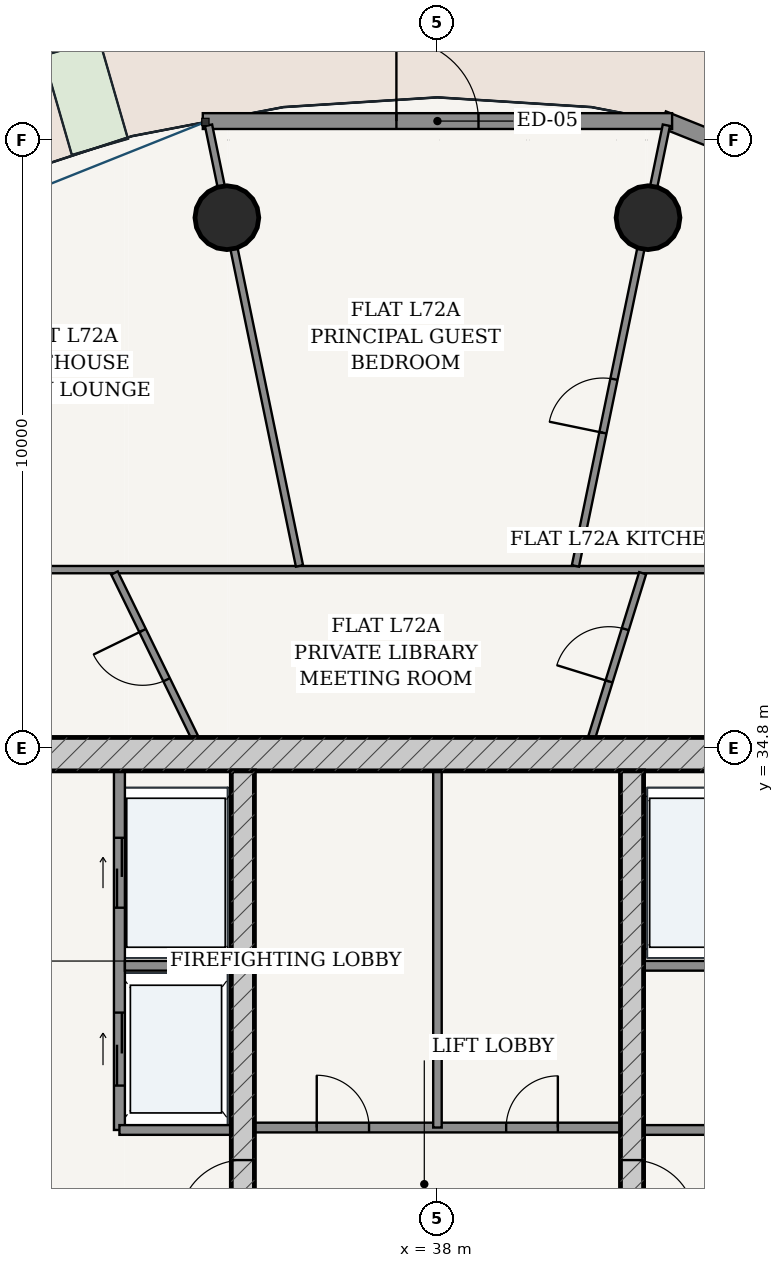
"""IFC4 building model, lengths in metres.
Left out: names, types, materials, properties, quantities, classifications, styles, units other than length and angle.
Written with IfcOpenShell. Run it as: python <this file> out.ifc"""

import sys

from ifc_helpers import new_model, si_unit, direction, frame, frame_2d, origin, origin_2d, place, context, subcontext, project, spatial, rectangle, hollow_circle, extrude, source, transform, mapped, element, fill, save


model = new_model("IFC4")
c1 = context("Model", 3, precision=1e-05, world=origin(), true_north=direction((-0.2419218956, 0.970295726276)))
c2 = subcontext(c1, "Body", "Model", "MODEL_VIEW")
j1 = project(units=[si_unit("LENGTHUNIT", "METRE"), si_unit("PLANEANGLEUNIT", "RADIAN")], contexts=[c1])
p1 = place(None, origin())
s1 = spatial("IfcSite", under=j1, at=p1, CompositionType="ELEMENT")
p2 = place(p1, origin())
s2 = spatial("IfcBuilding", under=s1, at=p2, CompositionType="ELEMENT")
p3 = place(p2, frame((0.0, 0.0, 274.45)))
s3 = spatial("IfcBuildingStorey", under=s2, at=p3, CompositionType="ELEMENT", Elevation=274.45)
p4 = place(p3, frame((28.825, 34.7, 0.0), z_axis=(0.0, 0.0, 1.0), x_axis=(1.0, 0.0, 0.0)))
e1 = element("IfcWall", 1, at=p4, inside=s3, PredefinedType="SHEAR", context=c2, shape_type="SweptSolid", body=[
    extrude(rectangle(XDim=18.35, YDim=0.55, at=frame_2d((9.175, 0.0))), origin(), (0.0, 0.0, 1.0), 3.49),
])
p5 = place(p3, frame((34.8, 19.175, 0.0), z_axis=(0.0, 0.0, 1.0), x_axis=(0.0, 1.0, 0.0)))
e2 = element("IfcWall", 2, at=p5, inside=s3, PredefinedType="SHEAR", context=c2, shape_type="SweptSolid", body=[
    extrude(rectangle(XDim=15.25, YDim=0.38, at=frame_2d((7.625, 0.0))), origin(), (0.0, 0.0, 1.0), 3.49),
])
p6 = place(p5, frame((7.8, 0.0, 0.0)))
e3 = element("IfcOpeningElement", 3, at=p6, cuts=e2, PredefinedType="OPENING", context=c2, shape_type="SweptSolid", body=[
    extrude(rectangle(XDim=1.05, YDim=2.15, at=frame_2d((0.525, 1.075))), frame((0.0, 0.2, 0.0), z_axis=(0.0, -1.0, 0.0), x_axis=(1.0, 0.0, 0.0)), (0.0, 0.0, 1.0), 0.4),
])
p7 = place(p3, frame((41.2, 19.175, 0.0), z_axis=(0.0, 0.0, 1.0), x_axis=(0.0, 1.0, 0.0)))
e4 = element("IfcWall", 4, at=p7, inside=s3, PredefinedType="SHEAR", context=c2, shape_type="SweptSolid", body=[
    extrude(rectangle(XDim=15.25, YDim=0.38, at=frame_2d((7.625, 0.0))), origin(), (0.0, 0.0, 1.0), 3.49),
])
p8 = place(p7, frame((7.8, 0.0, 0.0)))
e5 = element("IfcOpeningElement", 5, at=p8, cuts=e4, PredefinedType="OPENING", context=c2, shape_type="SweptSolid", body=[
    extrude(rectangle(XDim=1.05, YDim=2.15, at=frame_2d((0.525, 1.075))), frame((0.0, 0.2, 0.0), z_axis=(0.0, -1.0, 0.0), x_axis=(1.0, 0.0, 0.0)), (0.0, 0.0, 1.0), 0.4),
])
for number, where, z_axis, x_axis in (
    (6, (41.463, 43.522, 0.0), (0.0, 0.0, 1.0), (1.0, 0.0, 0.0)),
    (7, (34.537, 43.522, 0.0), (0.0, 0.0, 1.0), (1.0, 0.0, 0.0)),
):
    element("IfcColumn", number, at=place(p3, frame(where, z_axis=z_axis, x_axis=x_axis)), inside=s3, PredefinedType="COLUMN", context=c2, shape_type="SweptSolid", body=[
        extrude(hollow_circle(Radius=0.525, WallThickness=0.035, at=origin_2d()), origin(), (0.0, 0.0, 1.0), 3.75),
    ])
p9 = place(p3, frame((48.836, 42.294, 0.0), z_axis=(0.0, 0.0, 1.0), x_axis=(-0.928724272392, 0.370771123296, 0.0)))
e8 = element("IfcWall", 8, at=p9, inside=s3, PredefinedType="SOLIDWALL", context=c2, shape_type="SweptSolid", body=[
    extrude(rectangle(XDim=7.678, YDim=0.28, at=frame_2d((3.839, 0.0))), origin(), (0.0, 0.0, 1.0), 3.49),
])
p10 = place(p9, frame((1.298, 0.0, 0.85)))
e9 = element("IfcOpeningElement", 9, at=p10, cuts=e8, PredefinedType="OPENING", context=c2, shape_type="SweptSolid", body=[
    extrude(rectangle(XDim=1.55, YDim=1.95, at=frame_2d((0.775, 0.975))), frame((0.0, 0.15, 0.0), z_axis=(0.0, -1.0, 0.0), x_axis=(1.0, 0.0, 0.0)), (0.0, 0.0, 1.0), 0.3),
])
p11 = place(p9, frame((4.83, 0.0, 0.85)))
e10 = element("IfcOpeningElement", 10, at=p11, cuts=e8, PredefinedType="OPENING", context=c2, shape_type="SweptSolid", body=[
    extrude(rectangle(XDim=1.55, YDim=1.95, at=frame_2d((0.775, 0.975))), frame((0.0, 0.15, 0.0), z_axis=(0.0, -1.0, 0.0), x_axis=(1.0, 0.0, 0.0)), (0.0, 0.0, 1.0), 0.3),
])
p12 = place(p3, frame((41.859, 45.111, 0.0), z_axis=(0.0, 0.0, 1.0), x_axis=(-1.0, 0.0, 0.0)))
e11 = element("IfcWall", 11, at=p12, inside=s3, PredefinedType="SOLIDWALL", context=c2, shape_type="SweptSolid", body=[
    extrude(rectangle(XDim=7.718, YDim=0.26, at=frame_2d((3.859, 0.0))), origin(), (0.0, 0.0, 1.0), 3.49),
])
p13 = place(p12, frame((3.184, 0.0, 0.0)))
e12 = element("IfcOpeningElement", 12, at=p13, cuts=e11, PredefinedType="OPENING", context=c2, shape_type="SweptSolid", body=[
    extrude(rectangle(XDim=1.35, YDim=2.2, at=frame_2d((0.675, 1.1))), frame((0.0, 0.14, 0.0), z_axis=(0.0, -1.0, 0.0), x_axis=(1.0, 0.0, 0.0)), (0.0, 0.0, 1.0), 0.28),
])
p14 = place(p3, frame((32.77, 28.52, 0.0), z_axis=(0.0, 0.0, 1.0), x_axis=(0.0, 1.0, 0.0)))
e13 = element("IfcWall", 13, at=p14, inside=s3, PredefinedType="PARTITIONING", context=c2, shape_type="SweptSolid", body=[
    extrude(rectangle(XDim=5.905, YDim=0.18, at=frame_2d((2.953, 0.0))), origin(), (0.0, 0.0, 1.0), 3.49),
])
p15 = place(p14, frame((3.655, 0.0, 0.0)))
e14 = element("IfcOpeningElement", 14, at=p15, cuts=e13, PredefinedType="OPENING", context=c2, shape_type="SweptSolid", body=[
    extrude(rectangle(XDim=1.15, YDim=2.2, at=frame_2d((0.575, 1.1))), frame((0.0, 0.1, 0.0), z_axis=(0.0, -1.0, 0.0), x_axis=(1.0, 0.0, 0.0)), (0.0, 0.0, 1.0), 0.2),
])
p16 = place(p14, frame((0.73, 0.0, 0.0)))
e15 = element("IfcOpeningElement", 15, at=p16, cuts=e13, PredefinedType="OPENING", context=c2, shape_type="SweptSolid", body=[
    extrude(rectangle(XDim=1.2, YDim=2.25, at=frame_2d((0.6, 1.125))), frame((0.0, 0.1, 0.0), z_axis=(0.0, -1.0, 0.0), x_axis=(1.0, 0.0, 0.0)), (0.0, 0.0, 1.0), 0.2),
])
p17 = place(p3, frame((32.86, 31.22, 0.0), z_axis=(0.0, 0.0, 1.0), x_axis=(1.0, 0.0, 0.0)))
e16 = element("IfcWall", 16, at=p17, inside=s3, PredefinedType="PARTITIONING", context=c2, shape_type="SweptSolid", body=[
    extrude(rectangle(XDim=1.75, YDim=0.16, at=frame_2d((0.875, 0.0))), origin(), (0.0, 0.0, 1.0), 3.49),
])
p18 = place(p3, frame((32.77, 28.52, 0.0), z_axis=(0.0, 0.0, 1.0), x_axis=(1.0, 0.0, 0.0)))
e17 = element("IfcWall", 17, at=p18, inside=s3, PredefinedType="PARTITIONING", context=c2, shape_type="SweptSolid", body=[
    extrude(rectangle(XDim=1.84, YDim=0.16, at=frame_2d((0.92, 0.0))), origin(), (0.0, 0.0, 1.0), 3.49),
])
p19 = place(p3, frame((41.39, 31.22, 0.0), z_axis=(0.0, 0.0, 1.0), x_axis=(1.0, 0.0, 0.0)))
e18 = element("IfcWall", 18, at=p19, inside=s3, PredefinedType="PARTITIONING", context=c2, shape_type="SweptSolid", body=[
    extrude(rectangle(XDim=1.75, YDim=0.16, at=frame_2d((0.875, 0.0))), origin(), (0.0, 0.0, 1.0), 3.49),
])
p20 = place(p3, frame((41.39, 28.52, 0.0), z_axis=(0.0, 0.0, 1.0), x_axis=(1.0, 0.0, 0.0)))
e19 = element("IfcWall", 19, at=p20, inside=s3, PredefinedType="PARTITIONING", context=c2, shape_type="SweptSolid", body=[
    extrude(rectangle(XDim=1.84, YDim=0.16, at=frame_2d((0.92, 0.0))), origin(), (0.0, 0.0, 1.0), 3.49),
])
p21 = place(p3, frame((34.99, 28.56, 0.0), z_axis=(0.0, 0.0, 1.0), x_axis=(1.0, 0.0, 0.0)))
e20 = element("IfcWall", 20, at=p21, inside=s3, PredefinedType="PARTITIONING", context=c2, shape_type="SweptSolid", body=[
    extrude(rectangle(XDim=6.02, YDim=0.16, at=frame_2d((3.01, 0.0))), origin(), (0.0, 0.0, 1.0), 3.49),
])
p22 = place(p21, frame((1.025, 0.0, 0.0)))
e21 = element("IfcOpeningElement", 21, at=p22, cuts=e20, PredefinedType="OPENING", context=c2, shape_type="SweptSolid", body=[
    extrude(rectangle(XDim=0.86, YDim=2.1, at=frame_2d((0.43, 1.05))), frame((0.0, 0.09, 0.0), z_axis=(0.0, -1.0, 0.0), x_axis=(1.0, 0.0, 0.0)), (0.0, 0.0, 1.0), 0.18),
])
p23 = place(p21, frame((4.14, 0.0, 0.0)))
e22 = element("IfcOpeningElement", 22, at=p23, cuts=e20, PredefinedType="OPENING", context=c2, shape_type="SweptSolid", body=[
    extrude(rectangle(XDim=0.85, YDim=2.1, at=frame_2d((0.425, 1.05))), frame((0.0, 0.09, 0.0), z_axis=(0.0, -1.0, 0.0), x_axis=(1.0, 0.0, 0.0)), (0.0, 0.0, 1.0), 0.18),
])
p24 = place(p3, frame((38.0, 28.56, 0.0), z_axis=(0.0, 0.0, 1.0), x_axis=(0.0, 1.0, 0.0)))
e23 = element("IfcWall", 23, at=p24, inside=s3, PredefinedType="PARTITIONING", context=c2, shape_type="SweptSolid", body=[
    extrude(rectangle(XDim=5.865, YDim=0.14, at=frame_2d((2.933, 0.0))), origin(), (0.0, 0.0, 1.0), 3.49),
])
p25 = place(p3, frame((26.065, 37.735, 0.0), z_axis=(0.0, 0.0, 1.0), x_axis=(1.0, 0.0, 0.0)))
e24 = element("IfcWall", 24, at=p25, inside=s3, PredefinedType="PARTITIONING", context=c2, shape_type="SweptSolid", body=[
    extrude(rectangle(XDim=23.87, YDim=0.12, at=frame_2d((11.935, 0.0))), origin(), (0.0, 0.0, 1.0), 3.015),
])
p26 = place(p25, frame((18.46, 0.0, 0.0)))
e25 = element("IfcOpeningElement", 25, at=p26, cuts=e24, PredefinedType="OPENING", context=c2, shape_type="SweptSolid", body=[
    extrude(rectangle(XDim=0.9, YDim=2.15, at=frame_2d((0.45, 1.075))), frame((0.0, 0.07, 0.0), z_axis=(0.0, -1.0, 0.0), x_axis=(1.0, 0.0, 0.0)), (0.0, 0.0, 1.0), 0.14),
])
p27 = place(p25, frame((3.144, 0.0, 0.0)))
e26 = element("IfcOpeningElement", 26, at=p27, cuts=e24, PredefinedType="OPENING", context=c2, shape_type="SweptSolid", body=[
    extrude(rectangle(XDim=0.9, YDim=2.15, at=frame_2d((0.45, 1.075))), frame((0.0, 0.07, 0.0), z_axis=(0.0, -1.0, 0.0), x_axis=(1.0, 0.0, 0.0)), (0.0, 0.0, 1.0), 0.14),
])
p28 = place(p3, frame((40.269, 37.796, 0.0), z_axis=(0.0, 0.0, 1.0), x_axis=(0.202101574245, 0.979364566281, 0.0)))
e27 = element("IfcWall", 27, at=p28, inside=s3, PredefinedType="PARTITIONING", context=c2, shape_type="SweptSolid", body=[
    extrude(rectangle(XDim=7.4, YDim=0.12, at=frame_2d((3.7, 0.0))), origin(), (0.0, 0.0, 1.0), 3.015),
])
p29 = place(p28, frame((2.236, 0.0, 0.0)))
e28 = element("IfcOpeningElement", 28, at=p29, cuts=e27, PredefinedType="OPENING", context=c2, shape_type="SweptSolid", body=[
    extrude(rectangle(XDim=0.9, YDim=2.15, at=frame_2d((0.45, 1.075))), frame((0.0, 0.07, 0.0), z_axis=(0.0, -1.0, 0.0), x_axis=(1.0, 0.0, 0.0)), (0.0, 0.0, 1.0), 0.14),
])
p30 = place(p3, frame((35.731, 37.796, 0.0), z_axis=(0.0, 0.0, 1.0), x_axis=(-0.202101574245, 0.979364566281, 0.0)))
e29 = element("IfcWall", 29, at=p30, inside=s3, PredefinedType="PARTITIONING", context=c2, shape_type="SweptSolid", body=[
    extrude(rectangle(XDim=7.4, YDim=0.12, at=frame_2d((3.7, 0.0))), origin(), (0.0, 0.0, 1.0), 3.015),
])
p31 = place(p3, frame((40.537, 34.977, 0.0), z_axis=(0.0, 0.0, 1.0), x_axis=(0.29633127961, 0.95508521752, 0.0)))
e30 = element("IfcWall", 30, at=p31, inside=s3, PredefinedType="PARTITIONING", context=c2, shape_type="SweptSolid", body=[
    extrude(rectangle(XDim=2.826, YDim=0.12, at=frame_2d((1.413, 0.0))), origin(), (0.0, 0.0, 1.0), 2.575),
])
p32 = place(p31, frame((0.963, 0.0, 0.0)))
e31 = element("IfcOpeningElement", 31, at=p32, cuts=e30, PredefinedType="OPENING", context=c2, shape_type="SweptSolid", body=[
    extrude(rectangle(XDim=0.9, YDim=2.15, at=frame_2d((0.45, 1.075))), frame((0.0, 0.07, 0.0), z_axis=(0.0, -1.0, 0.0), x_axis=(1.0, 0.0, 0.0)), (0.0, 0.0, 1.0), 0.14),
])
p33 = place(p3, frame((34.008, 34.977, 0.0), z_axis=(0.0, 0.0, 1.0), x_axis=(-0.438717914863, 0.898624833386, 0.0)))
e32 = element("IfcWall", 32, at=p33, inside=s3, PredefinedType="PARTITIONING", context=c2, shape_type="SweptSolid", body=[
    extrude(rectangle(XDim=3.007, YDim=0.12, at=frame_2d((1.504, 0.0))), origin(), (0.0, 0.0, 1.0), 3.49),
])
p34 = place(p33, frame((1.054, 0.0, 0.0)))
e33 = element("IfcOpeningElement", 33, at=p34, cuts=e32, PredefinedType="OPENING", context=c2, shape_type="SweptSolid", body=[
    extrude(rectangle(XDim=0.9, YDim=2.15, at=frame_2d((0.45, 1.075))), frame((0.0, 0.07, 0.0), z_axis=(0.0, -1.0, 0.0), x_axis=(1.0, 0.0, 0.0)), (0.0, 0.0, 1.0), 0.14),
])
m1 = source(origin(), c2, "Body", "SweptSolid", [
    extrude(rectangle(XDim=1.35, YDim=2.2, at=frame_2d((0.675, 1.1))), frame((0.0, 0.025, 0.0), z_axis=(0.0, -1.0, 0.0), x_axis=(1.0, 0.0, 0.0)), (0.0, 0.0, 1.0), 0.05),
])
p35 = place(p13, frame((1.35, 0.0, 0.0), z_axis=(0.0, 0.0, 1.0), x_axis=(-1.0, 0.0, 0.0)))
e34 = element("IfcDoor", 34, at=p35, inside=s3, OperationType="SINGLE_SWING_LEFT", PredefinedType="DOOR", context=c2, shape_type="MappedRepresentation", body=[
    mapped(m1, transform((0.0, 0.0, 0.0), scale=1.0)),
])
fill(e12, e34)
m2 = source(origin(), c2, "Body", "SweptSolid", [
    extrude(rectangle(XDim=1.05, YDim=2.15, at=frame_2d((0.525, 1.075))), frame((0.0, 0.025, 0.0), z_axis=(0.0, -1.0, 0.0), x_axis=(1.0, 0.0, 0.0)), (0.0, 0.0, 1.0), 0.05),
])
p36 = place(p6, origin())
e35 = element("IfcDoor", 35, at=p36, inside=s3, OperationType="SINGLE_SWING_LEFT", PredefinedType="DOOR", context=c2, shape_type="MappedRepresentation", body=[
    mapped(m2, transform((0.0, 0.0, 0.0), scale=1.0)),
])
fill(e3, e35)
p37 = place(p8, frame((1.05, 0.0, 0.0), z_axis=(0.0, 0.0, 1.0), x_axis=(-1.0, 0.0, 0.0)))
e36 = element("IfcDoor", 36, at=p37, inside=s3, OperationType="SINGLE_SWING_RIGHT", PredefinedType="DOOR", context=c2, shape_type="MappedRepresentation", body=[
    mapped(m2, transform((0.0, 0.0, 0.0), scale=1.0)),
])
fill(e5, e36)
m3 = source(origin(), c2, "Body", "SweptSolid", [
    extrude(rectangle(XDim=0.86, YDim=2.1, at=frame_2d((0.43, 1.05))), frame((0.0, 0.025, 0.0), z_axis=(0.0, -1.0, 0.0), x_axis=(1.0, 0.0, 0.0)), (0.0, 0.0, 1.0), 0.05),
])
p38 = place(p22, origin())
e37 = element("IfcDoor", 37, at=p38, inside=s3, OperationType="SINGLE_SWING_LEFT", PredefinedType="DOOR", context=c2, shape_type="MappedRepresentation", body=[
    mapped(m3, transform((0.0, 0.0, 0.0), scale=1.0)),
])
fill(e21, e37)
m4 = source(origin(), c2, "Body", "SweptSolid", [
    extrude(rectangle(XDim=0.85, YDim=2.1, at=frame_2d((0.425, 1.05))), frame((0.0, 0.025, 0.0), z_axis=(0.0, -1.0, 0.0), x_axis=(1.0, 0.0, 0.0)), (0.0, 0.0, 1.0), 0.05),
])
p39 = place(p23, origin())
e38 = element("IfcDoor", 38, at=p39, inside=s3, OperationType="SINGLE_SWING_RIGHT", PredefinedType="DOOR", context=c2, shape_type="MappedRepresentation", body=[
    mapped(m4, transform((0.0, 0.0, 0.0), scale=1.0)),
])
fill(e22, e38)
m5 = source(origin(), c2, "Body", "SweptSolid", [
    extrude(rectangle(XDim=1.15, YDim=2.2, at=frame_2d((0.575, 1.1))), frame((0.0, 0.025, 0.0), z_axis=(0.0, -1.0, 0.0), x_axis=(1.0, 0.0, 0.0)), (0.0, 0.0, 1.0), 0.05),
])
p40 = place(p15, origin())
e39 = element("IfcDoor", 39, at=p40, inside=s3, OperationType="DOUBLE_DOOR_SLIDING", PredefinedType="DOOR", context=c2, shape_type="MappedRepresentation", body=[
    mapped(m5, transform((0.0, 0.0, 0.0), scale=1.0)),
])
fill(e14, e39)
m6 = source(origin(), c2, "Body", "SweptSolid", [
    extrude(rectangle(XDim=1.2, YDim=2.25, at=frame_2d((0.6, 1.125))), frame((0.0, 0.025, 0.0), z_axis=(0.0, -1.0, 0.0), x_axis=(1.0, 0.0, 0.0)), (0.0, 0.0, 1.0), 0.05),
])
p41 = place(p16, origin())
e40 = element("IfcDoor", 40, at=p41, inside=s3, OperationType="DOUBLE_DOOR_SLIDING", PredefinedType="DOOR", context=c2, shape_type="MappedRepresentation", body=[
    mapped(m6, transform((0.0, 0.0, 0.0), scale=1.0)),
])
fill(e15, e40)
m7 = source(origin(), c2, "Body", "SweptSolid", [
    extrude(rectangle(XDim=0.9, YDim=2.15, at=frame_2d((0.45, 1.075))), frame((0.0, 0.025, 0.0), z_axis=(0.0, -1.0, 0.0), x_axis=(1.0, 0.0, 0.0)), (0.0, 0.0, 1.0), 0.05),
])
p42 = place(p32, origin())
e41 = element("IfcDoor", 41, at=p42, inside=s3, OperationType="SINGLE_SWING_LEFT", PredefinedType="DOOR", context=c2, shape_type="MappedRepresentation", body=[
    mapped(m7, transform((0.0, 0.0, 0.0), scale=1.0)),
])
fill(e31, e41)
p43 = place(p34, origin())
e42 = element("IfcDoor", 42, at=p43, inside=s3, OperationType="SINGLE_SWING_RIGHT", PredefinedType="DOOR", context=c2, shape_type="MappedRepresentation", body=[
    mapped(m7, transform((0.0, 0.0, 0.0), scale=1.0)),
])
fill(e33, e42)
p44 = place(p29, origin())
e43 = element("IfcDoor", 43, at=p44, inside=s3, OperationType="SINGLE_SWING_LEFT", PredefinedType="DOOR", context=c2, shape_type="MappedRepresentation", body=[
    mapped(m7, transform((0.0, 0.0, 0.0), scale=1.0)),
])
fill(e28, e43)
save(model, sys.argv[1])
